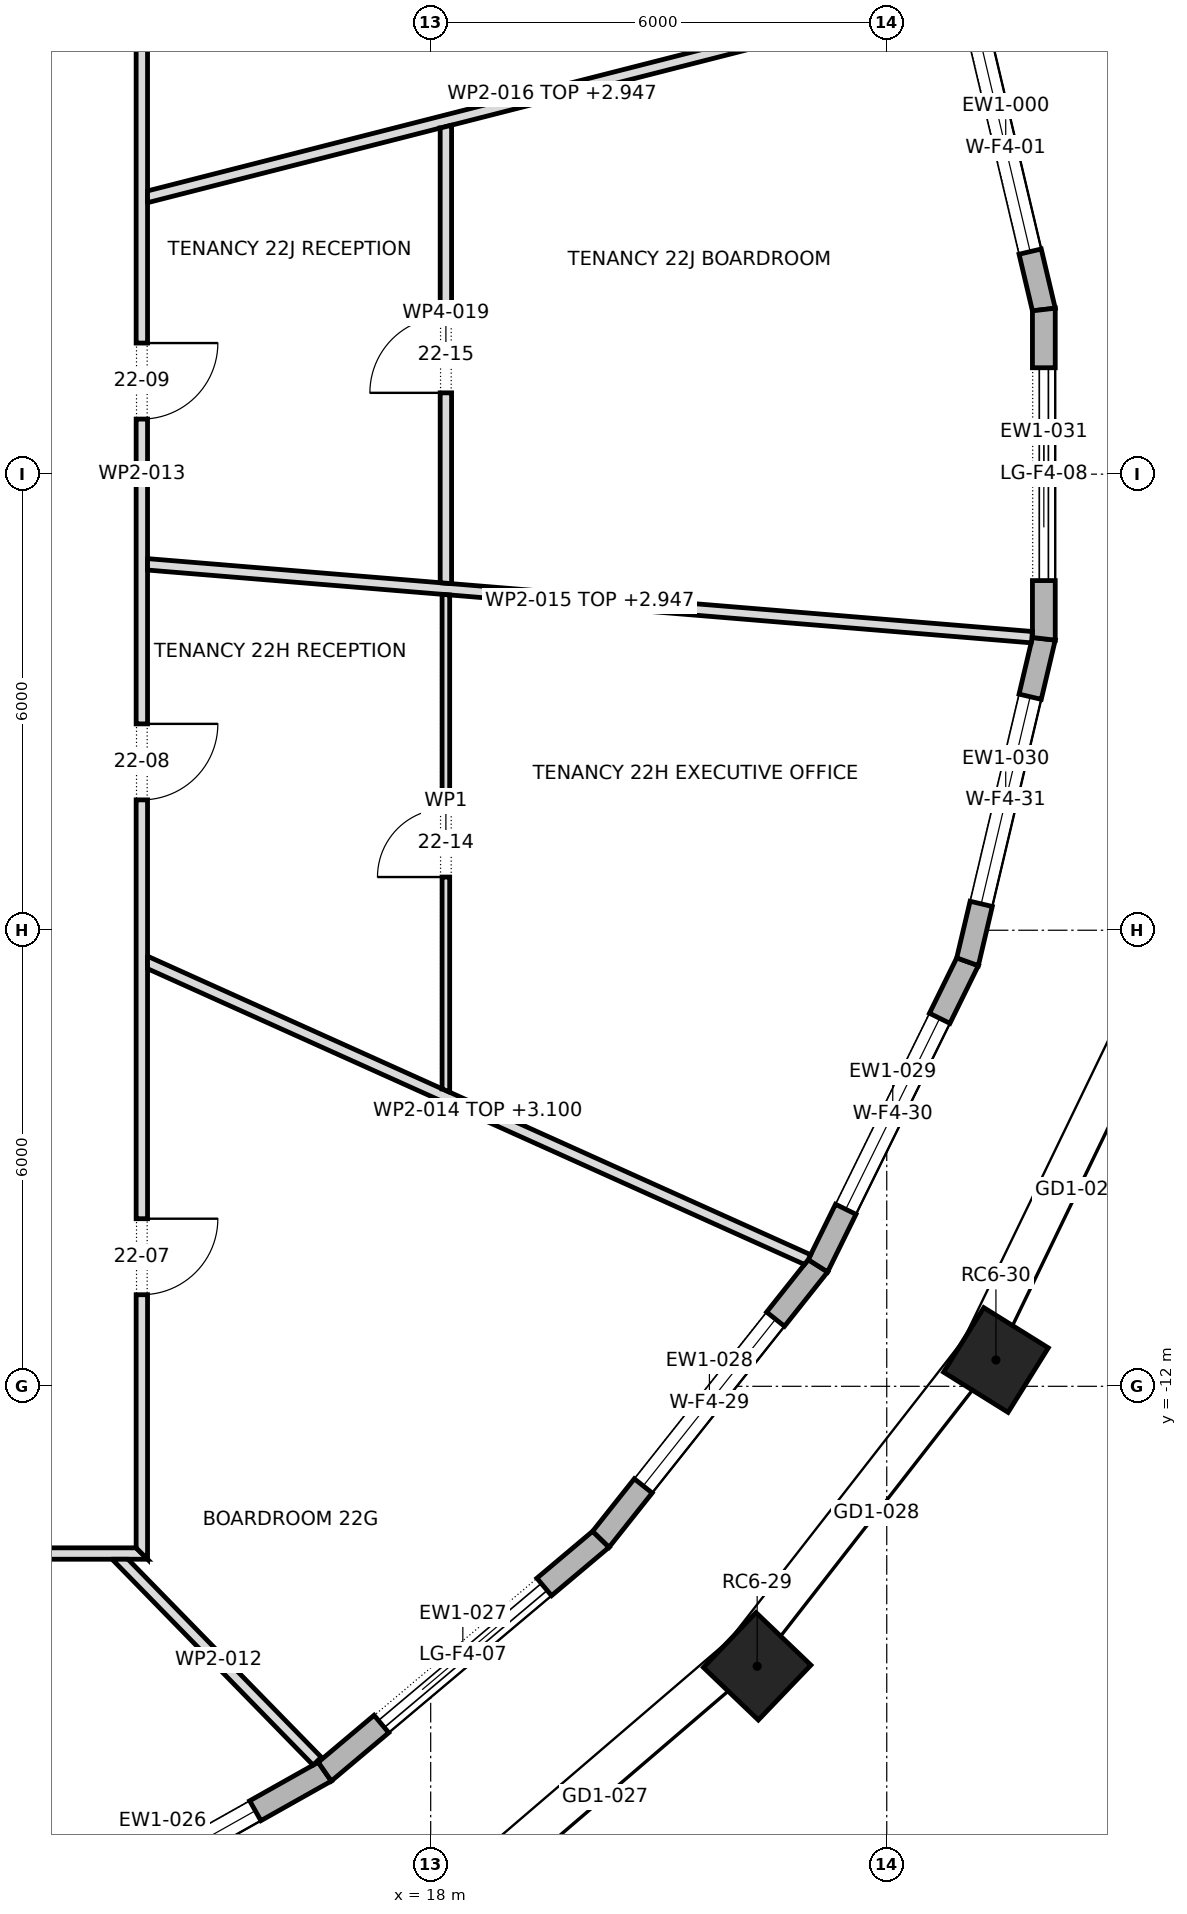
"""IFC4 building model, lengths in metres.
Left out: names, types, materials, properties, quantities, classifications, styles, units other than length and angle.
Written with IfcOpenShell. Run it as: python <this file> out.ifc"""

import sys

from ifc_helpers import new_model, si_unit, direction, frame, frame_2d, origin, origin_2d, place, context, subcontext, project, spatial, polyline, rectangle, outline, extrude, element, fill, save


model = new_model("IFC4")
c1 = context("Model", 3, precision=1e-05, world=origin(), true_north=direction((0.0, 1.0)))
c2 = subcontext(c1, "Body", "Model", "MODEL_VIEW")
j1 = project(units=[si_unit("LENGTHUNIT", "METRE"), si_unit("PLANEANGLEUNIT", "RADIAN")], contexts=[c1])
p1 = place(None, origin())
s1 = spatial("IfcSite", under=j1, at=p1, CompositionType="ELEMENT")
p2 = place(p1, origin())
s2 = spatial("IfcBuilding", under=s1, at=p2, CompositionType="ELEMENT")
p3 = place(p2, frame((0.0, 0.0, 304.3)))
s3 = spatial("IfcBuildingStorey", under=s2, at=p3, CompositionType="ELEMENT", Elevation=304.3)
for number, where, z_axis, x_axis in (
    (1, (22.295, -15.683, 0.0), (0.0, 0.0, 1.0), (0.692, 0.722, 0.0)),
    (2, (25.437, -11.654, 0.0), (0.0, 0.0, 1.0), (0.529, 0.849, 0.0)),
):
    element("IfcColumn", number, at=place(p3, frame(where, z_axis=z_axis, x_axis=x_axis)), inside=s3, PredefinedType="COLUMN", context=c2, shape_type="SweptSolid", body=[
        extrude(rectangle(XDim=1.0, YDim=1.0, at=origin_2d()), origin(), (0.0, 0.0, 1.0), 4.0),
    ])
p4 = place(p3, frame((26.067, 2.166, 0.0), z_axis=(0.0, 0.0, 1.0), x_axis=(-0.229974411334, 0.973196675977, 0.0)))
e3 = element("IfcWall", 3, at=p4, inside=s3, PredefinedType="STANDARD", context=c2, shape_type="SweptSolid", body=[
    extrude(outline(polyline([(-0.018, -0.15), (4.382, -0.15), (4.348, 0.15), (0.018, 0.15), (-0.018, -0.15)])), origin(), (0.0, 0.0, 1.0), 3.7),
])
p5 = place(p4, frame((0.783, 0.0, 0.6)))
e4 = element("IfcOpeningElement", 4, at=p5, cuts=e3, PredefinedType="OPENING", context=c2, shape_type="SweptSolid", body=[
    extrude(rectangle(XDim=2.8, YDim=2.65, at=frame_2d((1.4, 1.325))), frame((0.0, 0.162, 0.0), z_axis=(0.0, -1.0, 0.0), x_axis=(1.0, 0.0, 0.0)), (0.0, 0.0, 1.0), 0.324),
])
p6 = place(p3, frame((12.338, -19.471, 0.0), z_axis=(0.0, 0.0, 1.0), x_axis=(0.871570211895, 0.490270706588, 0.0)))
e5 = element("IfcWall", 5, at=p6, inside=s3, PredefinedType="STANDARD", context=c2, shape_type="SweptSolid", body=[
    extrude(outline(polyline([(-0.013, -0.15), (4.912, -0.15), (4.883, 0.15), (0.013, 0.15), (-0.013, -0.15)])), origin(), (0.0, 0.0, 1.0), 3.7),
])
p7 = place(p6, frame((1.049, 0.0, 0.6)))
e6 = element("IfcOpeningElement", 6, at=p7, cuts=e5, PredefinedType="OPENING", context=c2, shape_type="SweptSolid", body=[
    extrude(rectangle(XDim=2.8, YDim=2.65, at=frame_2d((1.4, 1.325))), frame((0.0, 0.162, 0.0), z_axis=(0.0, -1.0, 0.0), x_axis=(1.0, 0.0, 0.0)), (0.0, 0.0, 1.0), 0.324),
])
p8 = place(p3, frame((16.607, -17.07, 0.0), z_axis=(0.0, 0.0, 1.0), x_axis=(0.765059193792, 0.643959959931, 0.0)))
e7 = element("IfcWall", 7, at=p8, inside=s3, PredefinedType="STANDARD", context=c2, shape_type="SweptSolid", body=[
    extrude(outline(polyline([(-0.014, -0.15), (4.763, -0.15), (4.733, 0.15), (0.014, 0.15), (-0.014, -0.15)])), origin(), (0.0, 0.0, 1.0), 3.7),
])
p9 = place(p8, frame((0.974, 0.0, 0.0)))
e8 = element("IfcOpeningElement", 8, at=p9, cuts=e7, PredefinedType="OPENING", context=c2, shape_type="SweptSolid", body=[
    extrude(rectangle(XDim=2.8, YDim=3.25, at=frame_2d((1.4, 1.625))), frame((0.0, 0.162, 0.0), z_axis=(0.0, -1.0, 0.0), x_axis=(1.0, 0.0, 0.0)), (0.0, 0.0, 1.0), 0.324),
])
p10 = place(p3, frame((20.239, -14.012, 0.0), z_axis=(0.0, 0.0, 1.0), x_axis=(0.621682706372, 0.78326918272, 0.0)))
e9 = element("IfcWall", 9, at=p10, inside=s3, PredefinedType="STANDARD", context=c2, shape_type="SweptSolid", body=[
    extrude(outline(polyline([(-0.015, -0.15), (4.609, -0.15), (4.577, 0.15), (0.015, 0.15), (-0.015, -0.15)])), origin(), (0.0, 0.0, 1.0), 3.7),
])
p11 = place(p10, frame((0.896, 0.0, 0.6)))
e10 = element("IfcOpeningElement", 10, at=p11, cuts=e9, PredefinedType="OPENING", context=c2, shape_type="SweptSolid", body=[
    extrude(rectangle(XDim=2.8, YDim=2.65, at=frame_2d((1.4, 1.325))), frame((0.0, 0.162, 0.0), z_axis=(0.0, -1.0, 0.0), x_axis=(1.0, 0.0, 0.0)), (0.0, 0.0, 1.0), 0.324),
])
p12 = place(p3, frame((23.094, -10.415, 0.0), z_axis=(0.0, 0.0, 1.0), x_axis=(0.441509050872, 0.897256796017, 0.0)))
e11 = element("IfcWall", 11, at=p12, inside=s3, PredefinedType="STANDARD", context=c2, shape_type="SweptSolid", body=[
    extrude(outline(polyline([(-0.016, -0.15), (4.475, -0.15), (4.441, 0.15), (0.016, 0.15), (-0.016, -0.15)])), origin(), (0.0, 0.0, 1.0), 3.7),
])
p13 = place(p12, frame((0.829, 0.0, 0.6)))
e12 = element("IfcOpeningElement", 12, at=p13, cuts=e11, PredefinedType="OPENING", context=c2, shape_type="SweptSolid", body=[
    extrude(rectangle(XDim=2.8, YDim=2.65, at=frame_2d((1.4, 1.325))), frame((0.0, 0.162, 0.0), z_axis=(0.0, -1.0, 0.0), x_axis=(1.0, 0.0, 0.0)), (0.0, 0.0, 1.0), 0.324),
])
p14 = place(p3, frame((25.063, -6.415, 0.0), z_axis=(0.0, 0.0, 1.0), x_axis=(0.229974411334, 0.973196675977, 0.0)))
e13 = element("IfcWall", 13, at=p14, inside=s3, PredefinedType="STANDARD", context=c2, shape_type="SweptSolid", body=[
    extrude(outline(polyline([(-0.017, -0.15), (4.383, -0.15), (4.348, 0.15), (0.017, 0.15), (-0.017, -0.15)])), origin(), (0.0, 0.0, 1.0), 3.7),
])
p15 = place(p14, frame((0.783, 0.0, 0.6)))
e14 = element("IfcOpeningElement", 14, at=p15, cuts=e13, PredefinedType="OPENING", context=c2, shape_type="SweptSolid", body=[
    extrude(rectangle(XDim=2.8, YDim=2.65, at=frame_2d((1.4, 1.325))), frame((0.0, 0.162, 0.0), z_axis=(0.0, -1.0, 0.0), x_axis=(1.0, 0.0, 0.0)), (0.0, 0.0, 1.0), 0.324),
])
p16 = place(p3, frame((26.067, -2.166, 0.0), z_axis=(0.0, 0.0, 1.0), x_axis=(0.0, 1.0, 0.0)))
e15 = element("IfcWall", 15, at=p16, inside=s3, PredefinedType="STANDARD", context=c2, shape_type="SweptSolid", body=[
    extrude(outline(polyline([(-0.018, -0.15), (4.35, -0.15), (4.315, 0.15), (0.018, 0.15), (-0.018, -0.15)])), origin(), (0.0, 0.0, 1.0), 3.7),
])
p17 = place(p16, frame((0.766, 0.0, 0.0)))
e16 = element("IfcOpeningElement", 16, at=p17, cuts=e15, PredefinedType="OPENING", context=c2, shape_type="SweptSolid", body=[
    extrude(rectangle(XDim=2.8, YDim=3.25, at=frame_2d((1.4, 1.625))), frame((0.0, 0.162, 0.0), z_axis=(0.0, -1.0, 0.0), x_axis=(1.0, 0.0, 0.0)), (0.0, 0.0, 1.0), 0.324),
])
p18 = place(p3, frame((-14.275, -14.2, 0.0), z_axis=(0.0, 0.0, 1.0), x_axis=(1.0, 0.0, 0.0)))
e17 = element("IfcWall", 17, at=p18, inside=s3, PredefinedType="PARTITIONING", context=c2, shape_type="SweptSolid", body=[
    extrude(outline(polyline([(28.55, -0.075), (28.55, -0.075), (28.4, 0.075), (26.517, 0.075), (24.633, 0.075), (22.75, 0.075), (20.866, 0.075), (18.983, 0.075), (17.1, 0.075), (15.217, 0.075), (13.333, 0.075), (11.45, 0.075), (9.567, 0.075), (7.683, 0.075), (5.8, 0.075), (3.917, 0.075), (2.033, 0.075), (0.15, 0.075), (0.0, -0.075), (1.903, -0.075), (3.807, -0.075), (5.71, -0.075), (7.613, -0.075), (9.517, -0.075), (11.42, -0.075), (13.323, -0.075), (15.227, -0.075), (17.13, -0.075), (19.033, -0.075), (20.937, -0.075), (22.84, -0.075), (24.743, -0.075), (26.646, -0.075), (28.55, -0.075)])), origin(), (0.0, 0.0, 1.0), 3.7),
])
p19 = place(p18, frame((2.165, 0.0, 0.0)))
e18 = element("IfcOpeningElement", 18, at=p19, cuts=e17, PredefinedType="OPENING", context=c2, shape_type="SweptSolid", body=[
    extrude(rectangle(XDim=1.0, YDim=2.1, at=frame_2d((0.5, 1.05))), frame((0.0, 0.087, 0.0), z_axis=(0.0, -1.0, 0.0), x_axis=(1.0, 0.0, 0.0)), (0.0, 0.0, 1.0), 0.174),
])
p20 = place(p18, frame((11.825, 0.0, 0.0)))
e19 = element("IfcOpeningElement", 19, at=p20, cuts=e17, PredefinedType="OPENING", context=c2, shape_type="SweptSolid", body=[
    extrude(rectangle(XDim=1.0, YDim=2.1, at=frame_2d((0.5, 1.05))), frame((0.0, 0.087, 0.0), z_axis=(0.0, -1.0, 0.0), x_axis=(1.0, 0.0, 0.0)), (0.0, 0.0, 1.0), 0.174),
])
p21 = place(p18, frame((23.255, 0.0, 0.0)))
e20 = element("IfcOpeningElement", 20, at=p21, cuts=e17, PredefinedType="OPENING", context=c2, shape_type="SweptSolid", body=[
    extrude(rectangle(XDim=1.0, YDim=2.1, at=frame_2d((0.5, 1.05))), frame((0.0, 0.087, 0.0), z_axis=(0.0, -1.0, 0.0), x_axis=(1.0, 0.0, 0.0)), (0.0, 0.0, 1.0), 0.174),
])
p22 = place(p3, frame((13.862, -14.223, 0.0), z_axis=(0.0, 0.0, 1.0), x_axis=(0.698607487782, -0.715505120887, 0.0)))
e21 = element("IfcWall", 21, at=p22, inside=s3, PredefinedType="PARTITIONING", context=c2, shape_type="SweptSolid", body=[
    extrude(outline(polyline([(3.785, 0.075), (1.966, 0.075), (0.146, 0.075), (0.0, -0.074), (0.0, -0.075), (1.893, -0.075), (3.785, -0.075), (3.785, 0.075)])), origin(), (0.0, 0.0, 1.0), 3.7),
])
p23 = place(p3, frame((14.2, -14.275, 0.0), z_axis=(0.0, 0.0, 1.0), x_axis=(0.0, 1.0, 0.0)))
e22 = element("IfcWall", 22, at=p23, inside=s3, PredefinedType="PARTITIONING", context=c2, shape_type="SweptSolid", body=[
    extrude(outline(polyline([(28.55, -0.075), (28.55, -0.075), (28.4, 0.075), (26.517, 0.075), (24.633, 0.075), (22.75, 0.075), (20.866, 0.075), (18.983, 0.075), (17.1, 0.075), (15.217, 0.075), (13.333, 0.075), (11.45, 0.075), (9.567, 0.075), (7.683, 0.075), (5.8, 0.075), (3.917, 0.075), (2.033, 0.075), (0.15, 0.075), (0.0, -0.075), (1.903, -0.075), (3.807, -0.075), (5.71, -0.075), (7.613, -0.075), (9.517, -0.075), (11.42, -0.075), (13.323, -0.075), (15.227, -0.075), (17.13, -0.075), (19.033, -0.075), (20.937, -0.075), (22.84, -0.075), (24.743, -0.075), (26.646, -0.075), (28.55, -0.075)])), origin(), (0.0, 0.0, 1.0), 3.7),
])
p24 = place(p23, frame((3.48, 0.0, 0.0)))
e23 = element("IfcOpeningElement", 23, at=p24, cuts=e22, PredefinedType="OPENING", context=c2, shape_type="SweptSolid", body=[
    extrude(rectangle(XDim=1.0, YDim=2.1, at=frame_2d((0.5, 1.05))), frame((0.0, 0.087, 0.0), z_axis=(0.0, -1.0, 0.0), x_axis=(1.0, 0.0, 0.0)), (0.0, 0.0, 1.0), 0.174),
])
p25 = place(p23, frame((9.99, 0.0, 0.0)))
e24 = element("IfcOpeningElement", 24, at=p25, cuts=e22, PredefinedType="OPENING", context=c2, shape_type="SweptSolid", body=[
    extrude(rectangle(XDim=1.0, YDim=2.1, at=frame_2d((0.5, 1.05))), frame((0.0, 0.087, 0.0), z_axis=(0.0, -1.0, 0.0), x_axis=(1.0, 0.0, 0.0)), (0.0, 0.0, 1.0), 0.174),
])
p26 = place(p23, frame((15.0, 0.0, 0.0)))
e25 = element("IfcOpeningElement", 25, at=p26, cuts=e22, PredefinedType="OPENING", context=c2, shape_type="SweptSolid", body=[
    extrude(rectangle(XDim=1.0, YDim=2.1, at=frame_2d((0.5, 1.05))), frame((0.0, 0.087, 0.0), z_axis=(0.0, -1.0, 0.0), x_axis=(1.0, 0.0, 0.0)), (0.0, 0.0, 1.0), 0.174),
])
p27 = place(p23, frame((20.495, 0.0, 0.0)))
e26 = element("IfcOpeningElement", 26, at=p27, cuts=e22, PredefinedType="OPENING", context=c2, shape_type="SweptSolid", body=[
    extrude(rectangle(XDim=1.0, YDim=2.1, at=frame_2d((0.5, 1.05))), frame((0.0, 0.087, 0.0), z_axis=(0.0, -1.0, 0.0), x_axis=(1.0, 0.0, 0.0)), (0.0, 0.0, 1.0), 0.174),
])
p28 = place(p3, frame((14.245, -6.41, 0.0), z_axis=(0.0, 0.0, 1.0), x_axis=(0.911854164739, -0.410514289944, 0.0)))
e27 = element("IfcWall", 27, at=p28, inside=s3, PredefinedType="PARTITIONING", context=c2, shape_type="SweptSolid", body=[
    extrude(outline(polyline([(0.067, -0.075), (1.963, -0.075), (3.858, -0.075), (5.754, -0.075), (7.649, -0.075), (9.545, -0.075), (9.564, 0.003), (9.567, 0.069), (9.567, 0.075), (7.795, 0.075), (6.024, 0.075), (4.252, 0.075), (4.25, 0.074), (4.249, 0.075), (2.833, 0.075), (1.417, 0.075), (0.0, 0.075), (0.0, 0.074), (0.067, -0.075)])), origin(), (0.0, 0.0, 1.0), 3.1),
])
p29 = place(p3, frame((14.269, -1.186, 0.0), z_axis=(0.0, 0.0, 1.0), x_axis=(0.996625584757, -0.082081933503, 0.0)))
e28 = element("IfcWall", 28, at=p29, inside=s3, PredefinedType="PARTITIONING", context=c2, shape_type="SweptSolid", body=[
    extrude(outline(polyline([(0.012, -0.075), (1.956, -0.075), (3.9, -0.075), (5.844, -0.075), (7.788, -0.075), (9.732, -0.075), (11.676, -0.075), (11.68, -0.05), (11.68, 0.075), (9.733, 0.075), (7.787, 0.075), (5.84, 0.075), (3.893, 0.075), (1.947, 0.075), (0.0, 0.075), (0.0, 0.07), (0.012, -0.075)])), origin(), (0.0, 0.0, 1.0), 2.947),
])
p30 = place(p3, frame((14.257, 3.645, 0.0), z_axis=(0.0, 0.0, 1.0), x_axis=(0.968996414646, 0.247074783017, 0.0)))
e29 = element("IfcWall", 29, at=p30, inside=s3, PredefinedType="PARTITIONING", context=c2, shape_type="SweptSolid", body=[
    extrude(outline(polyline([(0.0, -0.075), (1.987, -0.075), (3.973, -0.075), (3.973, -0.073), (3.979, -0.075), (5.735, -0.075), (7.491, -0.075), (9.248, -0.075), (11.004, -0.075), (11.004, 0.008), (10.99, 0.075), (9.164, 0.075), (7.339, 0.075), (5.514, 0.075), (3.688, 0.075), (1.863, 0.075), (0.038, 0.075), (0.0, -0.074), (0.0, -0.075)])), origin(), (0.0, 0.0, 1.0), 2.947),
])
p31 = place(p3, frame((18.2, -1.581, 0.0), z_axis=(0.0, 0.0, 1.0), x_axis=(0.0, -1.0, 0.0)))
e30 = element("IfcWall", 30, at=p31, inside=s3, PredefinedType="PARTITIONING", context=c2, shape_type="SweptSolid", body=[
    extrude(outline(polyline([(0.0, -0.05), (1.626, -0.05), (3.252, -0.05), (4.879, -0.05), (6.505, -0.05), (6.55, 0.05), (6.55, 0.05), (4.915, 0.05), (3.279, 0.05), (1.643, 0.05), (0.008, 0.05), (0.0, -0.044), (0.0, -0.05)])), origin(), (0.0, 0.0, 1.0), 3.7),
])
p32 = place(p31, frame((2.819, 0.0, 0.0)))
e31 = element("IfcOpeningElement", 31, at=p32, cuts=e30, PredefinedType="OPENING", context=c2, shape_type="SweptSolid", body=[
    extrude(rectangle(XDim=0.9, YDim=2.1, at=frame_2d((0.45, 1.05))), frame((0.0, 0.062, 0.0), z_axis=(0.0, -1.0, 0.0), x_axis=(1.0, 0.0, 0.0)), (0.0, 0.0, 1.0), 0.124),
])
p33 = place(p3, frame((18.2, 4.592, 0.0), z_axis=(0.0, 0.0, 1.0), x_axis=(0.0, -1.0, 0.0)))
e32 = element("IfcWall", 32, at=p33, inside=s3, PredefinedType="PARTITIONING", context=c2, shape_type="SweptSolid", body=[
    extrude(outline(polyline([(0.038, -0.075), (2.032, -0.075), (4.026, -0.075), (6.02, -0.075), (6.031, 0.07), (6.031, 0.075), (4.524, 0.075), (3.016, 0.075), (1.508, 0.075), (0.0, 0.075), (0.0, 0.074), (0.038, -0.075)])), origin(), (0.0, 0.0, 1.0), 3.7),
])
p34 = place(p33, frame((2.521, 0.0, 0.0)))
e33 = element("IfcOpeningElement", 33, at=p34, cuts=e32, PredefinedType="OPENING", context=c2, shape_type="SweptSolid", body=[
    extrude(rectangle(XDim=1.0, YDim=2.1, at=frame_2d((0.5, 1.05))), frame((0.0, 0.087, 0.0), z_axis=(0.0, -1.0, 0.0), x_axis=(1.0, 0.0, 0.0)), (0.0, 0.0, 1.0), 0.174),
])
p35 = place(p5, origin())
e34 = element("IfcWindow", 34, at=p35, inside=s3, PartitioningType="DOUBLE_PANEL_VERTICAL", PredefinedType="WINDOW", context=c2, shape_type="SweptSolid", body=[
    extrude(rectangle(XDim=2.8, YDim=2.65, at=frame_2d((1.4, 1.325))), frame((0.0, 0.03, 0.0), z_axis=(0.0, -1.0, 0.0), x_axis=(1.0, 0.0, 0.0)), (0.0, 0.0, 1.0), 0.06),
])
fill(e4, e34)
p36 = place(p7, origin())
e35 = element("IfcWindow", 35, at=p36, inside=s3, PartitioningType="DOUBLE_PANEL_VERTICAL", PredefinedType="WINDOW", context=c2, shape_type="SweptSolid", body=[
    extrude(rectangle(XDim=2.8, YDim=2.65, at=frame_2d((1.4, 1.325))), frame((0.0, 0.03, 0.0), z_axis=(0.0, -1.0, 0.0), x_axis=(1.0, 0.0, 0.0)), (0.0, 0.0, 1.0), 0.06),
])
fill(e6, e35)
p37 = place(p9, origin())
e36 = element("IfcDoor", 36, at=p37, inside=s3, OperationType="DOUBLE_DOOR_SLIDING", PredefinedType="DOOR", context=c2, shape_type="SweptSolid", body=[
    extrude(rectangle(XDim=2.8, YDim=3.25, at=frame_2d((1.4, 1.625))), frame((0.0, 0.025, 0.0), z_axis=(0.0, -1.0, 0.0), x_axis=(1.0, 0.0, 0.0)), (0.0, 0.0, 1.0), 0.05),
])
fill(e8, e36)
p38 = place(p11, origin())
e37 = element("IfcWindow", 37, at=p38, inside=s3, PartitioningType="DOUBLE_PANEL_VERTICAL", PredefinedType="WINDOW", context=c2, shape_type="SweptSolid", body=[
    extrude(rectangle(XDim=2.8, YDim=2.65, at=frame_2d((1.4, 1.325))), frame((0.0, 0.03, 0.0), z_axis=(0.0, -1.0, 0.0), x_axis=(1.0, 0.0, 0.0)), (0.0, 0.0, 1.0), 0.06),
])
fill(e10, e37)
p39 = place(p13, origin())
e38 = element("IfcWindow", 38, at=p39, inside=s3, PartitioningType="DOUBLE_PANEL_VERTICAL", PredefinedType="WINDOW", context=c2, shape_type="SweptSolid", body=[
    extrude(rectangle(XDim=2.8, YDim=2.65, at=frame_2d((1.4, 1.325))), frame((0.0, 0.03, 0.0), z_axis=(0.0, -1.0, 0.0), x_axis=(1.0, 0.0, 0.0)), (0.0, 0.0, 1.0), 0.06),
])
fill(e12, e38)
p40 = place(p15, origin())
e39 = element("IfcWindow", 39, at=p40, inside=s3, PartitioningType="DOUBLE_PANEL_VERTICAL", PredefinedType="WINDOW", context=c2, shape_type="SweptSolid", body=[
    extrude(rectangle(XDim=2.8, YDim=2.65, at=frame_2d((1.4, 1.325))), frame((0.0, 0.03, 0.0), z_axis=(0.0, -1.0, 0.0), x_axis=(1.0, 0.0, 0.0)), (0.0, 0.0, 1.0), 0.06),
])
fill(e14, e39)
p41 = place(p17, origin())
e40 = element("IfcDoor", 40, at=p41, inside=s3, OperationType="DOUBLE_DOOR_SLIDING", PredefinedType="DOOR", context=c2, shape_type="SweptSolid", body=[
    extrude(rectangle(XDim=2.8, YDim=3.25, at=frame_2d((1.4, 1.625))), frame((0.0, 0.025, 0.0), z_axis=(0.0, -1.0, 0.0), x_axis=(1.0, 0.0, 0.0)), (0.0, 0.0, 1.0), 0.05),
])
fill(e16, e40)
p42 = place(p24, frame((1.0, 0.0, 0.0), z_axis=(0.0, 0.0, 1.0), x_axis=(-1.0, 0.0, 0.0)))
e41 = element("IfcDoor", 41, at=p42, inside=s3, OperationType="SINGLE_SWING_RIGHT", PredefinedType="DOOR", context=c2, shape_type="SweptSolid", body=[
    extrude(rectangle(XDim=1.0, YDim=2.1, at=frame_2d((0.5, 1.05))), frame((0.0, 0.025, 0.0), z_axis=(0.0, -1.0, 0.0), x_axis=(1.0, 0.0, 0.0)), (0.0, 0.0, 1.0), 0.05),
])
fill(e23, e41)
p43 = place(p25, frame((1.0, 0.0, 0.0), z_axis=(0.0, 0.0, 1.0), x_axis=(-1.0, 0.0, 0.0)))
e42 = element("IfcDoor", 42, at=p43, inside=s3, OperationType="SINGLE_SWING_RIGHT", PredefinedType="DOOR", context=c2, shape_type="SweptSolid", body=[
    extrude(rectangle(XDim=1.0, YDim=2.1, at=frame_2d((0.5, 1.05))), frame((0.0, 0.025, 0.0), z_axis=(0.0, -1.0, 0.0), x_axis=(1.0, 0.0, 0.0)), (0.0, 0.0, 1.0), 0.05),
])
fill(e24, e42)
p44 = place(p26, frame((1.0, 0.0, 0.0), z_axis=(0.0, 0.0, 1.0), x_axis=(-1.0, 0.0, 0.0)))
e43 = element("IfcDoor", 43, at=p44, inside=s3, OperationType="SINGLE_SWING_RIGHT", PredefinedType="DOOR", context=c2, shape_type="SweptSolid", body=[
    extrude(rectangle(XDim=1.0, YDim=2.1, at=frame_2d((0.5, 1.05))), frame((0.0, 0.025, 0.0), z_axis=(0.0, -1.0, 0.0), x_axis=(1.0, 0.0, 0.0)), (0.0, 0.0, 1.0), 0.05),
])
fill(e25, e43)
p45 = place(p32, frame((0.9, 0.0, 0.0), z_axis=(0.0, 0.0, 1.0), x_axis=(-1.0, 0.0, 0.0)))
e44 = element("IfcDoor", 44, at=p45, inside=s3, OperationType="SINGLE_SWING_RIGHT", PredefinedType="DOOR", context=c2, shape_type="SweptSolid", body=[
    extrude(rectangle(XDim=0.9, YDim=2.1, at=frame_2d((0.45, 1.05))), frame((0.0, 0.025, 0.0), z_axis=(0.0, -1.0, 0.0), x_axis=(1.0, 0.0, 0.0)), (0.0, 0.0, 1.0), 0.05),
])
fill(e31, e44)
p46 = place(p34, frame((1.0, 0.0, 0.0), z_axis=(0.0, 0.0, 1.0), x_axis=(-1.0, 0.0, 0.0)))
e45 = element("IfcDoor", 45, at=p46, inside=s3, OperationType="SINGLE_SWING_RIGHT", PredefinedType="DOOR", context=c2, shape_type="SweptSolid", body=[
    extrude(rectangle(XDim=1.0, YDim=2.1, at=frame_2d((0.5, 1.05))), frame((0.0, 0.025, 0.0), z_axis=(0.0, -1.0, 0.0), x_axis=(1.0, 0.0, 0.0)), (0.0, 0.0, 1.0), 0.05),
])
fill(e33, e45)
save(model, sys.argv[1])
